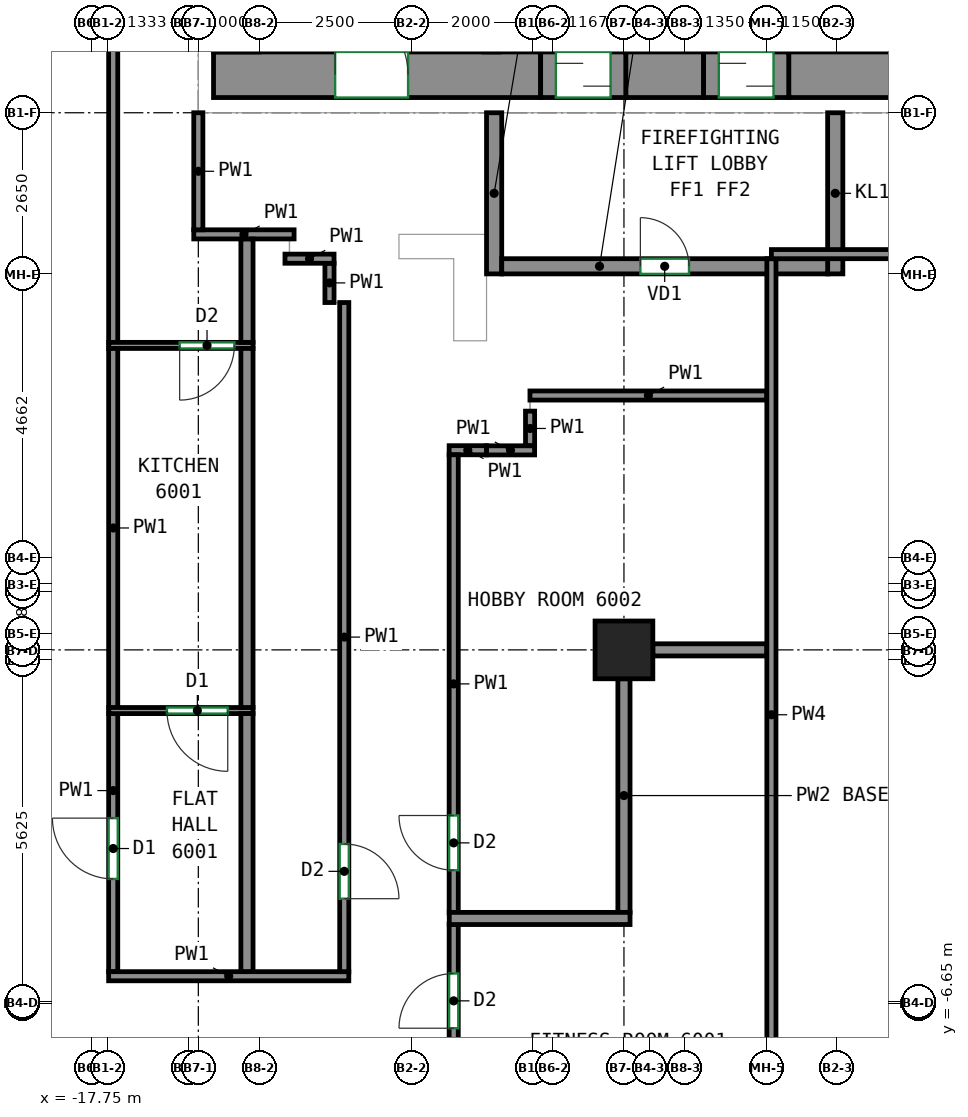
"""IFC4 building model, lengths in metres.
Left out: names, types, materials, properties, quantities, classifications, styles, units other than length and angle.
Written with IfcOpenShell. Run it as: python <this file> out.ifc"""

import sys

from ifc_helpers import new_model, si_unit, direction, frame, frame_2d, origin, origin_2d, place, context, subcontext, project, spatial, rectangle, extrude, source, transform, mapped, element, fill, save


model = new_model("IFC4")
c1 = context("Model", 3, precision=1e-05, world=origin(), true_north=direction((0.0, 1.0)))
c2 = subcontext(c1, "Body", "Model", "MODEL_VIEW")
j1 = project(units=[si_unit("LENGTHUNIT", "METRE"), si_unit("PLANEANGLEUNIT", "RADIAN")], contexts=[c1])
p1 = place(None, origin())
s1 = spatial("IfcSite", under=j1, at=p1, CompositionType="ELEMENT")
p2 = place(p1, origin())
s2 = spatial("IfcBuilding", under=s1, at=p2, CompositionType="ELEMENT")
p3 = place(p2, frame((0.0, 0.0, 249.2)))
s3 = spatial("IfcBuildingStorey", under=s2, at=p3, CompositionType="ELEMENT", Elevation=249.2)
m1 = source(origin(), c2, "Body", "SweptSolid", [
    extrude(rectangle(XDim=0.95, YDim=0.95, at=origin_2d()), origin(), (0.0, 0.0, 1.0), 3.12),
])
p4 = place(p3, frame((-9.0, -0.833, 0.0), z_axis=(0.0, 0.0, 1.0), x_axis=(1.0, 0.0, 0.0)))
e1 = element("IfcColumn", 1, at=p4, inside=s3, PredefinedType="COLUMN", context=c2, shape_type="MappedRepresentation", body=[
    mapped(m1, transform((0.0, 0.0, 0.0))),
])
m2 = source(origin(), c2, "Body", "SweptSolid", [
    extrude(rectangle(XDim=5.38, YDim=0.75, at=frame_2d((2.69, 0.0))), origin(), (0.0, 0.0, 1.0), 3.12),
])
p5 = place(p3, frame((-15.75, 8.625, 0.0), z_axis=(0.0, 0.0, 1.0), x_axis=(1.0, 0.0, 0.0)))
e2 = element("IfcWall", 2, at=p5, inside=s3, PredefinedType="SHEAR", context=c2, shape_type="MappedRepresentation", body=[
    mapped(m2, transform((0.0, 0.0, 0.0))),
])
p6 = place(p5, frame((2.0, 0.0, 0.0)))
e3 = element("IfcOpeningElement", 3, at=p6, cuts=e2, PredefinedType="OPENING", context=c2, shape_type="SweptSolid", body=[
    extrude(rectangle(XDim=1.2, YDim=2.1, at=frame_2d((0.6, 1.05))), frame((0.0, 0.385, 0.0), z_axis=(0.0, -1.0, 0.0), x_axis=(1.0, 0.0, 0.0)), (0.0, 0.0, 1.0), 0.77),
])
m3 = source(origin(), c2, "Body", "SweptSolid", [
    extrude(rectangle(XDim=1.28, YDim=0.75, at=frame_2d((0.64, 0.0))), origin(), (0.0, 0.0, 1.0), 3.12),
])
p7 = place(p3, frame((-8.97, 8.625, 0.0), z_axis=(0.0, 0.0, 1.0), x_axis=(1.0, 0.0, 0.0)))
e4 = element("IfcWall", 4, at=p7, inside=s3, PredefinedType="SHEAR", context=c2, shape_type="MappedRepresentation", body=[
    mapped(m3, transform((0.0, 0.0, 0.0))),
])
m4 = source(origin(), c2, "Body", "SweptSolid", [
    extrude(rectangle(XDim=14.18, YDim=0.75, at=frame_2d((7.09, 0.0))), origin(), (0.0, 0.0, 1.0), 3.12),
])
p8 = place(p3, frame((-6.29, 8.625, 0.0), z_axis=(0.0, 0.0, 1.0), x_axis=(1.0, 0.0, 0.0)))
e5 = element("IfcWall", 5, at=p8, inside=s3, PredefinedType="SHEAR", context=c2, shape_type="MappedRepresentation", body=[
    mapped(m4, transform((0.0, 0.0, 0.0))),
])
m5 = source(origin(), c2, "Body", "SweptSolid", [
    extrude(rectangle(XDim=2.65, YDim=0.25, at=frame_2d((1.325, 0.0))), origin(), (0.0, 0.0, 1.0), 2.57),
])
for number, where, z_axis, x_axis in (
    (6, (-11.135, 5.35, 0.0), (0.0, 0.0, 1.0), (0.0, 1.0, 0.0)),
    (7, (-5.525, 5.35, 0.0), (0.0, 0.0, 1.0), (0.0, 1.0, 0.0)),
):
    element("IfcWall", number, at=place(p3, frame(where, z_axis=z_axis, x_axis=x_axis)), inside=s3, PredefinedType="PARTITIONING", context=c2, shape_type="MappedRepresentation", body=[
        mapped(m5, transform((0.0, 0.0, 0.0))),
    ])
m6 = source(origin(), c2, "Body", "SweptSolid", [
    extrude(rectangle(XDim=5.36, YDim=0.25, at=frame_2d((2.68, 0.0))), origin(), (0.0, 0.0, 1.0), 3.12),
])
p9 = place(p3, frame((-11.01, 5.475, 0.0), z_axis=(0.0, 0.0, 1.0), x_axis=(1.0, 0.0, 0.0)))
e8 = element("IfcWall", 8, at=p9, inside=s3, PredefinedType="PARTITIONING", context=c2, shape_type="MappedRepresentation", body=[
    mapped(m6, transform((0.0, 0.0, 0.0))),
])
p10 = place(p9, frame((2.28, 0.0, 0.0)))
e9 = element("IfcOpeningElement", 9, at=p10, cuts=e8, PredefinedType="OPENING", context=c2, shape_type="SweptSolid", body=[
    extrude(rectangle(XDim=0.8, YDim=2.0, at=frame_2d((0.4, 1.0))), frame((0.0, 0.135, 0.0), z_axis=(0.0, -1.0, 0.0), x_axis=(1.0, 0.0, 0.0)), (0.0, 0.0, 1.0), 0.27),
])
m7 = source(origin(), c2, "Body", "SweptSolid", [
    extrude(rectangle(XDim=1.4, YDim=0.75, at=frame_2d((0.7, 0.0))), origin(), (0.0, 0.0, 1.0), 2.7),
])
p11 = place(p3, frame((-10.37, 8.625, 0.0), z_axis=(0.0, 0.0, 1.0), x_axis=(1.0, 0.0, 0.0)))
e10 = element("IfcWall", 10, at=p11, inside=s3, PredefinedType="PARTITIONING", context=c2, shape_type="MappedRepresentation", body=[
    mapped(m7, transform((0.0, 0.0, 0.0))),
])
p12 = place(p11, frame((0.25, 0.0, 0.0)))
e11 = element("IfcOpeningElement", 11, at=p12, cuts=e10, PredefinedType="OPENING", context=c2, shape_type="SweptSolid", body=[
    extrude(rectangle(XDim=0.9, YDim=2.1, at=frame_2d((0.45, 1.05))), frame((0.0, 0.385, 0.0), z_axis=(0.0, -1.0, 0.0), x_axis=(1.0, 0.0, 0.0)), (0.0, 0.0, 1.0), 0.77),
])
m8 = source(origin(), c2, "Body", "SweptSolid", [
    extrude(rectangle(XDim=1.4, YDim=0.75, at=frame_2d((0.7, 0.0))), origin(), (0.0, 0.0, 1.0), 2.7),
])
p13 = place(p3, frame((-7.69, 8.625, 0.0), z_axis=(0.0, 0.0, 1.0), x_axis=(1.0, 0.0, 0.0)))
e12 = element("IfcWall", 12, at=p13, inside=s3, PredefinedType="PARTITIONING", context=c2, shape_type="MappedRepresentation", body=[
    mapped(m8, transform((0.0, 0.0, 0.0))),
])
p14 = place(p13, frame((0.25, 0.0, 0.0)))
e13 = element("IfcOpeningElement", 13, at=p14, cuts=e12, PredefinedType="OPENING", context=c2, shape_type="SweptSolid", body=[
    extrude(rectangle(XDim=0.9, YDim=2.1, at=frame_2d((0.45, 1.05))), frame((0.0, 0.385, 0.0), z_axis=(0.0, -1.0, 0.0), x_axis=(1.0, 0.0, 0.0)), (0.0, 0.0, 1.0), 0.77),
])
p15 = place(p3, frame((-17.4, -6.125, 0.0), z_axis=(0.0, 0.0, 1.0), x_axis=(0.0, 1.0, 0.0)))
e14 = element("IfcWall", 14, at=p15, inside=s3, PredefinedType="PARTITIONING", context=c2, shape_type="SweptSolid", body=[
    extrude(rectangle(XDim=4.254, YDim=0.15, at=frame_2d((2.127, 0.0))), origin(), (0.0, 0.0, 1.0), 3.12),
])
p16 = place(p15, frame((1.525, 0.0, 0.0)))
e15 = element("IfcOpeningElement", 15, at=p16, cuts=e14, PredefinedType="OPENING", context=c2, shape_type="SweptSolid", body=[
    extrude(rectangle(XDim=1.0, YDim=2.1, at=frame_2d((0.5, 1.05))), frame((0.0, 0.085, 0.0), z_axis=(0.0, -1.0, 0.0), x_axis=(1.0, 0.0, 0.0)), (0.0, 0.0, 1.0), 0.17),
])
p17 = place(p3, frame((-17.475, -6.2, 0.0), z_axis=(0.0, 0.0, 1.0), x_axis=(1.0, 0.0, 0.0)))
e16 = element("IfcWall", 16, at=p17, inside=s3, PredefinedType="PARTITIONING", context=c2, shape_type="SweptSolid", body=[
    extrude(rectangle(XDim=3.95, YDim=0.15, at=frame_2d((1.975, 0.0))), origin(), (0.0, 0.0, 1.0), 3.12),
])
p18 = place(p3, frame((-17.4, -1.791, 0.0), z_axis=(0.0, 0.0, 1.0), x_axis=(0.0, 1.0, 0.0)))
e17 = element("IfcWall", 17, at=p18, inside=s3, PredefinedType="PARTITIONING", context=c2, shape_type="SweptSolid", body=[
    extrude(rectangle(XDim=5.925, YDim=0.15, at=frame_2d((2.962, 0.0))), origin(), (0.0, 0.0, 1.0), 3.12),
])
p19 = place(p3, frame((-17.4, 4.214, 0.0), z_axis=(0.0, 0.0, 1.0), x_axis=(0.0, 1.0, 0.0)))
e18 = element("IfcWall", 18, at=p19, inside=s3, PredefinedType="PARTITIONING", context=c2, shape_type="SweptSolid", body=[
    extrude(rectangle(XDim=12.477, YDim=0.15, at=frame_2d((6.238, 0.0))), origin(), (0.0, 0.0, 1.0), 3.12),
])
p20 = place(p3, frame((-16.075, 6.0, 0.0), z_axis=(0.0, 0.0, 1.0), x_axis=(1.0, 0.0, 0.0)))
e19 = element("IfcWall", 19, at=p20, inside=s3, PredefinedType="PARTITIONING", context=c2, shape_type="SweptSolid", body=[
    extrude(rectangle(XDim=1.65, YDim=0.15, at=frame_2d((0.825, 0.0))), origin(), (0.0, 0.0, 1.0), 3.12),
])
p21 = place(p3, frame((-16.0, 6.075, 0.0), z_axis=(0.0, 0.0, 1.0), x_axis=(0.0, 1.0, 0.0)))
e20 = element("IfcWall", 20, at=p21, inside=s3, PredefinedType="PARTITIONING", context=c2, shape_type="SweptSolid", body=[
    extrude(rectangle(XDim=1.925, YDim=0.15, at=frame_2d((0.962, 0.0))), origin(), (0.0, 0.0, 1.0), 3.12),
])
p22 = place(p3, frame((-13.6, 4.879, 0.0), z_axis=(0.0, 0.0, 1.0), x_axis=(0.0, -1.0, 0.0)))
e21 = element("IfcWall", 21, at=p22, inside=s3, PredefinedType="PARTITIONING", context=c2, shape_type="SweptSolid", body=[
    extrude(rectangle(XDim=11.004, YDim=0.15, at=frame_2d((5.502, 0.0))), origin(), (0.0, 0.0, 1.0), 3.12),
])
p23 = place(p22, frame((8.904, 0.0, 0.0)))
e22 = element("IfcOpeningElement", 22, at=p23, cuts=e21, PredefinedType="OPENING", context=c2, shape_type="SweptSolid", body=[
    extrude(rectangle(XDim=0.9, YDim=2.1, at=frame_2d((0.45, 1.05))), frame((0.0, 0.085, 0.0), z_axis=(0.0, -1.0, 0.0), x_axis=(1.0, 0.0, 0.0)), (0.0, 0.0, 1.0), 0.17),
])
p24 = place(p3, frame((-13.843, 5.525, 0.0), z_axis=(0.0, 0.0, 1.0), x_axis=(0.0, -1.0, 0.0)))
e23 = element("IfcWall", 23, at=p24, inside=s3, PredefinedType="PARTITIONING", context=c2, shape_type="SweptSolid", body=[
    extrude(rectangle(XDim=0.646, YDim=0.15, at=frame_2d((0.323, 0.0))), origin(), (0.0, 0.0, 1.0), 3.12),
])
p25 = place(p3, frame((-14.575, 5.6, 0.0), z_axis=(0.0, 0.0, 1.0), x_axis=(1.0, 0.0, 0.0)))
e24 = element("IfcWall", 24, at=p25, inside=s3, PredefinedType="PARTITIONING", context=c2, shape_type="SweptSolid", body=[
    extrude(rectangle(XDim=0.807, YDim=0.15, at=frame_2d((0.403, 0.0))), origin(), (0.0, 0.0, 1.0), 3.12),
])
p26 = place(p3, frame((-10.546, 3.35, 0.0), z_axis=(0.0, 0.0, 1.0), x_axis=(1.0, 0.0, 0.0)))
e25 = element("IfcWall", 25, at=p26, inside=s3, PredefinedType="PARTITIONING", context=c2, shape_type="SweptSolid", body=[
    extrude(rectangle(XDim=3.896, YDim=0.15, at=frame_2d((1.948, 0.0))), origin(), (0.0, 0.0, 1.0), 3.12),
])
p27 = place(p3, frame((-10.544, 2.523, 0.0), z_axis=(0.0, 0.0, 1.0), x_axis=(0.0, 1.0, 0.0)))
e26 = element("IfcWall", 26, at=p27, inside=s3, PredefinedType="PARTITIONING", context=c2, shape_type="SweptSolid", body=[
    extrude(rectangle(XDim=0.57, YDim=0.15, at=frame_2d((0.285, 0.0))), origin(), (0.0, 0.0, 1.0), 3.12),
])
p28 = place(p3, frame((-11.262, 2.448, 0.0), z_axis=(0.0, 0.0, 1.0), x_axis=(1.0, 0.0, 0.0)))
e27 = element("IfcWall", 27, at=p28, inside=s3, PredefinedType="PARTITIONING", context=c2, shape_type="SweptSolid", body=[
    extrude(rectangle(XDim=0.793, YDim=0.15, at=frame_2d((0.396, 0.0))), origin(), (0.0, 0.0, 1.0), 3.12),
])
p29 = place(p3, frame((-11.875, 2.45, 0.0), z_axis=(0.0, 0.0, 1.0), x_axis=(1.0, 0.0, 0.0)))
e28 = element("IfcWall", 28, at=p29, inside=s3, PredefinedType="PARTITIONING", context=c2, shape_type="SweptSolid", body=[
    extrude(rectangle(XDim=0.613, YDim=0.15, at=frame_2d((0.307, 0.0))), origin(), (0.0, 0.0, 1.0), 3.12),
])
p30 = place(p3, frame((-11.8, -5.16, 0.0), z_axis=(0.0, 0.0, 1.0), x_axis=(0.0, 1.0, 0.0)))
e29 = element("IfcWall", 29, at=p30, inside=s3, PredefinedType="PARTITIONING", context=c2, shape_type="SweptSolid", body=[
    extrude(rectangle(XDim=7.535, YDim=0.15, at=frame_2d((3.768, 0.0))), origin(), (0.0, 0.0, 1.0), 3.12),
])
p31 = place(p30, frame((0.703, 0.0, 0.0)))
e30 = element("IfcOpeningElement", 30, at=p31, cuts=e29, PredefinedType="OPENING", context=c2, shape_type="SweptSolid", body=[
    extrude(rectangle(XDim=0.9, YDim=2.1, at=frame_2d((0.45, 1.05))), frame((0.0, 0.085, 0.0), z_axis=(0.0, -1.0, 0.0), x_axis=(1.0, 0.0, 0.0)), (0.0, 0.0, 1.0), 0.17),
])
p32 = place(p3, frame((-11.8, -10.125, 0.0), z_axis=(0.0, 0.0, 1.0), x_axis=(0.0, 1.0, 0.0)))
e31 = element("IfcWall", 31, at=p32, inside=s3, PredefinedType="PARTITIONING", context=c2, shape_type="SweptSolid", body=[
    extrude(rectangle(XDim=4.785, YDim=0.15, at=frame_2d((2.393, 0.0))), origin(), (0.0, 0.0, 1.0), 3.12),
])
p33 = place(p32, frame((3.07, 0.0, 0.0)))
e32 = element("IfcOpeningElement", 32, at=p33, cuts=e31, PredefinedType="OPENING", context=c2, shape_type="SweptSolid", body=[
    extrude(rectangle(XDim=0.9, YDim=2.1, at=frame_2d((0.45, 1.05))), frame((0.0, 0.085, 0.0), z_axis=(0.0, -1.0, 0.0), x_axis=(1.0, 0.0, 0.0)), (0.0, 0.0, 1.0), 0.17),
])
p34 = place(p3, frame((-15.1, -1.831, 0.0), z_axis=(0.0, 0.0, 1.0), x_axis=(-1.0, 0.0, 0.0)))
e33 = element("IfcWall", 33, at=p34, inside=s3, PredefinedType="PARTITIONING", context=c2, shape_type="SweptSolid", body=[
    extrude(rectangle(XDim=2.373, YDim=0.1, at=frame_2d((1.187, 0.0))), origin(), (0.0, 0.0, 1.0), 3.12),
])
p35 = place(p34, frame((0.416, 0.0, 0.0)))
e34 = element("IfcOpeningElement", 34, at=p35, cuts=e33, PredefinedType="OPENING", context=c2, shape_type="SweptSolid", body=[
    extrude(rectangle(XDim=1.0, YDim=2.1, at=frame_2d((0.5, 1.05))), frame((0.0, 0.06, 0.0), z_axis=(0.0, -1.0, 0.0), x_axis=(1.0, 0.0, 0.0)), (0.0, 0.0, 1.0), 0.12),
])
p36 = place(p3, frame((-15.2, -6.123, 0.0), z_axis=(0.0, 0.0, 1.0), x_axis=(0.0, 1.0, 0.0)))
e35 = element("IfcWall", 35, at=p36, inside=s3, PredefinedType="PARTITIONING", context=c2, shape_type="SweptSolid", body=[
    extrude(rectangle(XDim=4.242, YDim=0.2, at=frame_2d((2.121, 0.0))), origin(), (0.0, 0.0, 1.0), 3.12),
])
p37 = place(p3, frame((-15.1, 4.174, 0.0), z_axis=(0.0, 0.0, 1.0), x_axis=(-1.0, 0.0, 0.0)))
e36 = element("IfcWall", 36, at=p37, inside=s3, PredefinedType="PARTITIONING", context=c2, shape_type="SweptSolid", body=[
    extrude(rectangle(XDim=2.373, YDim=0.1, at=frame_2d((1.187, 0.0))), origin(), (0.0, 0.0, 1.0), 3.12),
])
p38 = place(p37, frame((0.307, 0.0, 0.0)))
e37 = element("IfcOpeningElement", 37, at=p38, cuts=e36, PredefinedType="OPENING", context=c2, shape_type="SweptSolid", body=[
    extrude(rectangle(XDim=0.9, YDim=2.1, at=frame_2d((0.45, 1.05))), frame((0.0, 0.06, 0.0), z_axis=(0.0, -1.0, 0.0), x_axis=(1.0, 0.0, 0.0)), (0.0, 0.0, 1.0), 0.12),
])
p39 = place(p3, frame((-15.2, -1.781, 0.0), z_axis=(0.0, 0.0, 1.0), x_axis=(0.0, 1.0, 0.0)))
e38 = element("IfcWall", 38, at=p39, inside=s3, PredefinedType="PARTITIONING", context=c2, shape_type="SweptSolid", body=[
    extrude(rectangle(XDim=5.905, YDim=0.2, at=frame_2d((2.953, 0.0))), origin(), (0.0, 0.0, 1.0), 3.12),
])
p40 = place(p3, frame((-15.2, 4.224, 0.0), z_axis=(0.0, 0.0, 1.0), x_axis=(0.0, 1.0, 0.0)))
e39 = element("IfcWall", 39, at=p40, inside=s3, PredefinedType="PARTITIONING", context=c2, shape_type="SweptSolid", body=[
    extrude(rectangle(XDim=1.699, YDim=0.2, at=frame_2d((0.85, 0.0))), origin(), (0.0, 0.0, 1.0), 3.12),
])
p41 = place(p3, frame((-8.525, -0.833, 0.0), z_axis=(0.0, 0.0, 1.0), x_axis=(1.0, 0.0, 0.0)))
e40 = element("IfcWall", 40, at=p41, inside=s3, PredefinedType="PARTITIONING", context=c2, shape_type="SweptSolid", body=[
    extrude(rectangle(XDim=1.875, YDim=0.2, at=frame_2d((0.938, 0.0))), origin(), (0.0, 0.0, 1.0), 3.12),
])
p42 = place(p3, frame((-9.0, -5.15, 0.0), z_axis=(0.0, 0.0, 1.0), x_axis=(0.0, 1.0, 0.0)))
e41 = element("IfcWall", 41, at=p42, inside=s3, PredefinedType="PARTITIONING", context=c2, shape_type="SweptSolid", body=[
    extrude(rectangle(XDim=3.842, YDim=0.2, at=frame_2d((1.921, 0.0))), origin(), (0.0, 0.0, 1.0), 2.57),
])
p43 = place(p3, frame((-11.873, -5.25, 0.0), z_axis=(0.0, 0.0, 1.0), x_axis=(1.0, 0.0, 0.0)))
e42 = element("IfcWall", 42, at=p43, inside=s3, PredefinedType="PARTITIONING", context=c2, shape_type="SweptSolid", body=[
    extrude(rectangle(XDim=2.973, YDim=0.2, at=frame_2d((1.487, 0.0))), origin(), (0.0, 0.0, 1.0), 3.12),
])
p44 = place(p3, frame((-6.575, -9.4, 0.0), z_axis=(0.0, 0.0, 1.0), x_axis=(0.0, 1.0, 0.0)))
e43 = element("IfcWall", 43, at=p44, inside=s3, PredefinedType="PARTITIONING", context=c2, shape_type="SweptSolid", body=[
    extrude(rectangle(XDim=15.0, YDim=0.15, at=frame_2d((7.5, 0.0))), origin(), (0.0, 0.0, 1.0), 3.12),
])
p45 = place(p3, frame((-6.575, 5.675, 0.0), z_axis=(0.0, 0.0, 1.0), x_axis=(1.0, 0.0, 0.0)))
e44 = element("IfcWall", 44, at=p45, inside=s3, PredefinedType="PARTITIONING", context=c2, shape_type="SweptSolid", body=[
    extrude(rectangle(XDim=15.075, YDim=0.15, at=frame_2d((7.538, 0.0))), origin(), (0.0, 0.0, 1.0), 3.12),
])
p46 = place(p10, origin())
e45 = element("IfcDoor", 45, at=p46, inside=s3, OperationType="SINGLE_SWING_LEFT", PredefinedType="DOOR", context=c2, shape_type="SweptSolid", body=[
    extrude(rectangle(XDim=0.8, YDim=2.0, at=frame_2d((0.4, 1.0))), frame((0.0, 0.025, 0.0), z_axis=(0.0, -1.0, 0.0), x_axis=(1.0, 0.0, 0.0)), (0.0, 0.0, 1.0), 0.05),
])
fill(e9, e45)
p47 = place(p12, origin())
e46 = element("IfcDoor", 46, at=p47, inside=s3, OperationType="SLIDING_TO_LEFT", PredefinedType="DOOR", context=c2, shape_type="SweptSolid", body=[
    extrude(rectangle(XDim=0.9, YDim=2.1, at=frame_2d((0.45, 1.05))), frame((0.0, 0.28, 0.0), z_axis=(0.0, -1.0, 0.0), x_axis=(1.0, 0.0, 0.0)), (0.0, 0.0, 1.0), 0.05),
])
fill(e11, e46)
p48 = place(p14, origin())
e47 = element("IfcDoor", 47, at=p48, inside=s3, OperationType="SLIDING_TO_RIGHT", PredefinedType="DOOR", context=c2, shape_type="SweptSolid", body=[
    extrude(rectangle(XDim=0.9, YDim=2.1, at=frame_2d((0.45, 1.05))), frame((0.0, 0.28, 0.0), z_axis=(0.0, -1.0, 0.0), x_axis=(1.0, 0.0, 0.0)), (0.0, 0.0, 1.0), 0.05),
])
fill(e13, e47)
p49 = place(p6, origin())
e48 = element("IfcDoor", 48, at=p49, inside=s3, OperationType="DOUBLE_DOOR_SINGLE_SWING", PredefinedType="DOOR", context=c2, shape_type="SweptSolid", body=[
    extrude(rectangle(XDim=1.2, YDim=2.1, at=frame_2d((0.6, 1.05))), frame((0.0, 0.28, 0.0), z_axis=(0.0, -1.0, 0.0), x_axis=(1.0, 0.0, 0.0)), (0.0, 0.0, 1.0), 0.05),
])
fill(e3, e48)
p50 = place(p33, origin())
e49 = element("IfcDoor", 49, at=p50, inside=s3, OperationType="SINGLE_SWING_LEFT", PredefinedType="DOOR", context=c2, shape_type="SweptSolid", body=[
    extrude(rectangle(XDim=0.9, YDim=2.1, at=frame_2d((0.45, 1.05))), frame((0.0, 0.025, 0.0), z_axis=(0.0, -1.0, 0.0), x_axis=(1.0, 0.0, 0.0)), (0.0, 0.0, 1.0), 0.05),
])
fill(e32, e49)
p51 = place(p23, origin())
e50 = element("IfcDoor", 50, at=p51, inside=s3, OperationType="SINGLE_SWING_RIGHT", PredefinedType="DOOR", context=c2, shape_type="SweptSolid", body=[
    extrude(rectangle(XDim=0.9, YDim=2.1, at=frame_2d((0.45, 1.05))), frame((0.0, 0.025, 0.0), z_axis=(0.0, -1.0, 0.0), x_axis=(1.0, 0.0, 0.0)), (0.0, 0.0, 1.0), 0.05),
])
fill(e22, e50)
p52 = place(p16, origin())
e51 = element("IfcDoor", 51, at=p52, inside=s3, OperationType="SINGLE_SWING_RIGHT", PredefinedType="DOOR", context=c2, shape_type="SweptSolid", body=[
    extrude(rectangle(XDim=1.0, YDim=2.1, at=frame_2d((0.5, 1.05))), frame((0.0, 0.025, 0.0), z_axis=(0.0, -1.0, 0.0), x_axis=(1.0, 0.0, 0.0)), (0.0, 0.0, 1.0), 0.05),
])
fill(e15, e51)
p53 = place(p31, origin())
e52 = element("IfcDoor", 52, at=p53, inside=s3, OperationType="SINGLE_SWING_RIGHT", PredefinedType="DOOR", context=c2, shape_type="SweptSolid", body=[
    extrude(rectangle(XDim=0.9, YDim=2.1, at=frame_2d((0.45, 1.05))), frame((0.0, 0.025, 0.0), z_axis=(0.0, -1.0, 0.0), x_axis=(1.0, 0.0, 0.0)), (0.0, 0.0, 1.0), 0.05),
])
fill(e30, e52)
p54 = place(p35, origin())
e53 = element("IfcDoor", 53, at=p54, inside=s3, OperationType="SINGLE_SWING_LEFT", PredefinedType="DOOR", context=c2, shape_type="SweptSolid", body=[
    extrude(rectangle(XDim=1.0, YDim=2.1, at=frame_2d((0.5, 1.05))), frame((0.0, 0.025, 0.0), z_axis=(0.0, -1.0, 0.0), x_axis=(1.0, 0.0, 0.0)), (0.0, 0.0, 1.0), 0.05),
])
fill(e34, e53)
p55 = place(p38, origin())
e54 = element("IfcDoor", 54, at=p55, inside=s3, OperationType="SINGLE_SWING_RIGHT", PredefinedType="DOOR", context=c2, shape_type="SweptSolid", body=[
    extrude(rectangle(XDim=0.9, YDim=2.1, at=frame_2d((0.45, 1.05))), frame((0.0, 0.025, 0.0), z_axis=(0.0, -1.0, 0.0), x_axis=(1.0, 0.0, 0.0)), (0.0, 0.0, 1.0), 0.05),
])
fill(e37, e54)
save(model, sys.argv[1])
